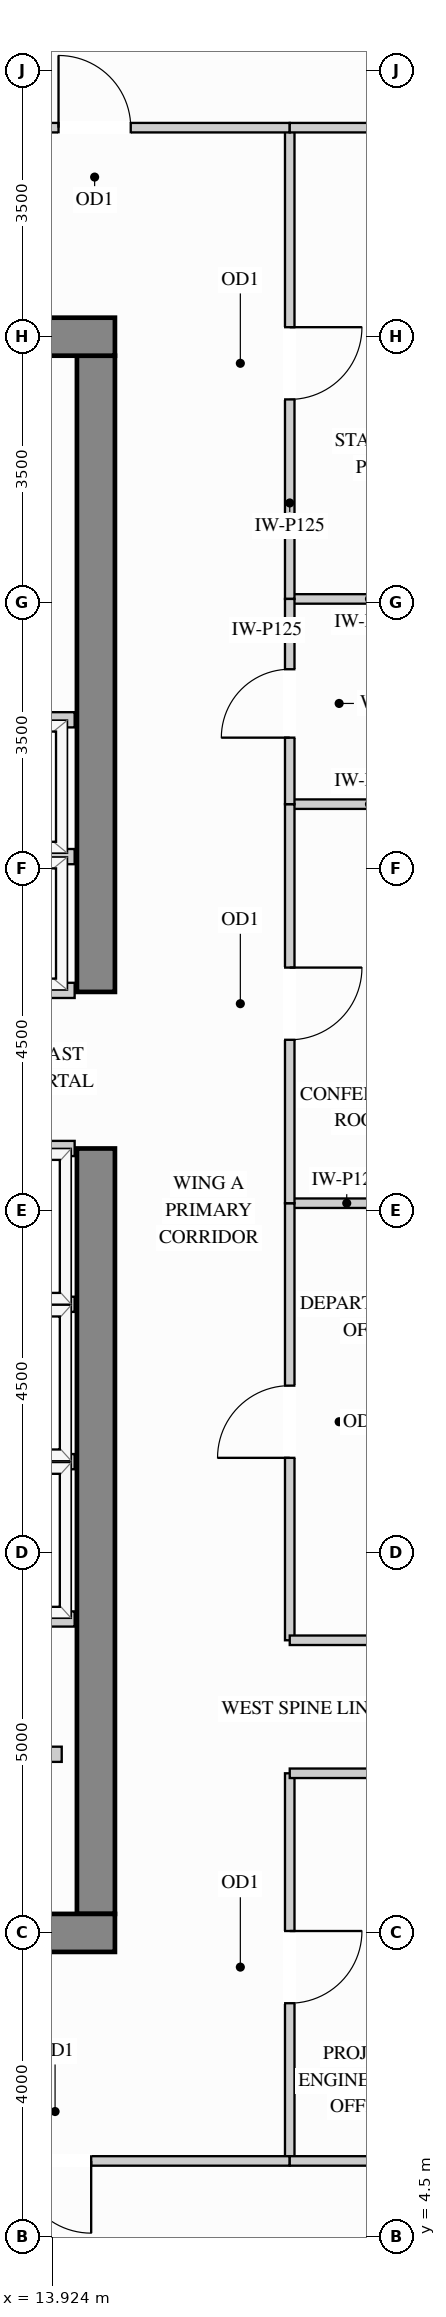
"""IFC4 building model, lengths in metres.
Left out: names, types, materials, properties, quantities, classifications, styles, units other than length and angle.
Written with IfcOpenShell. Run it as: python <this file> out.ifc"""

import sys

from ifc_helpers import new_model, si_unit, direction, frame, frame_2d, origin, place, context, subcontext, project, spatial, rectangle, extrude, source, transform, mapped, element, fill, save


model = new_model("IFC4")
c1 = context("Model", 3, precision=1e-05, world=origin(), true_north=direction((0.0, 1.0)))
c2 = subcontext(c1, "Body", "Model", "MODEL_VIEW")
j1 = project(units=[si_unit("LENGTHUNIT", "METRE"), si_unit("PLANEANGLEUNIT", "RADIAN")], contexts=[c1])
p1 = place(None, origin())
s1 = spatial("IfcSite", under=j1, at=p1, CompositionType="ELEMENT")
p2 = place(p1, origin())
s2 = spatial("IfcBuilding", under=s1, at=p2, CompositionType="ELEMENT")
p3 = place(p2, frame((0.0, 0.0, 259.2)))
s3 = spatial("IfcBuildingStorey", under=s2, at=p3, CompositionType="ELEMENT", Elevation=259.2)
m1 = source(origin(), c2, "Body", "SweptSolid", [
    extrude(rectangle(XDim=10.07, YDim=0.5, at=frame_2d((5.035, 0.0))), origin(), (0.0, 0.0, 1.0), 3.4),
])
p4 = place(p3, frame((14.5, 8.75, 0.0), z_axis=(0.0, 0.0, 1.0), x_axis=(0.0, 1.0, 0.0)))
e1 = element("IfcWall", 1, at=p4, inside=s3, PredefinedType="SHEAR", context=c2, shape_type="MappedRepresentation", body=[
    mapped(m1, transform((0.0, 0.0, 0.0), x_axis=(1.0, 0.0, 0.0), y_axis=(0.0, 1.0, 0.0), z_axis=(0.0, 0.0, 1.0))),
])
m2 = source(origin(), c2, "Body", "SweptSolid", [
    extrude(rectangle(XDim=8.37, YDim=0.5, at=frame_2d((4.185, 0.0))), origin(), (0.0, 0.0, 1.0), 3.4),
])
p5 = place(p3, frame((14.5, 20.88, 0.0), z_axis=(0.0, 0.0, 1.0), x_axis=(0.0, 1.0, 0.0)))
e2 = element("IfcWall", 2, at=p5, inside=s3, PredefinedType="SHEAR", context=c2, shape_type="MappedRepresentation", body=[
    mapped(m2, transform((0.0, 0.0, 0.0), x_axis=(1.0, 0.0, 0.0), y_axis=(0.0, 1.0, 0.0), z_axis=(0.0, 0.0, 1.0))),
])
m3 = source(origin(), c2, "Body", "SweptSolid", [
    extrude(rectangle(XDim=10.5, YDim=0.5, at=frame_2d((5.25, 0.0))), origin(), (0.0, 0.0, 1.0), 3.4),
])
for number, where, z_axis, x_axis in (
    (3, (4.25, 29.5, 0.0), (0.0, 0.0, 1.0), (1.0, 0.0, 0.0)),
    (4, (4.25, 8.5, 0.0), (0.0, 0.0, 1.0), (1.0, 0.0, 0.0)),
):
    element("IfcWall", number, at=place(p3, frame(where, z_axis=z_axis, x_axis=x_axis)), inside=s3, PredefinedType="SHEAR", context=c2, shape_type="MappedRepresentation", body=[
        mapped(m3, transform((0.0, 0.0, 0.0), x_axis=(1.0, 0.0, 0.0), y_axis=(0.0, 1.0, 0.0), z_axis=(0.0, 0.0, 1.0))),
    ])
m4 = source(origin(), c2, "Body", "SweptSolid", [
    extrude(rectangle(XDim=1.5, YDim=0.125, at=frame_2d((0.75, 0.0))), origin(), (0.0, 0.0, 1.0), 2.773),
])
p6 = place(p3, frame((17.05, 18.1, 0.0), z_axis=(0.0, 0.0, 1.0), x_axis=(1.0, 0.0, 0.0)))
e5 = element("IfcWall", 5, at=p6, inside=s3, PredefinedType="PARTITIONING", context=c2, shape_type="MappedRepresentation", body=[
    mapped(m4, transform((0.0, 0.0, 0.0), x_axis=(1.0, 0.0, 0.0), y_axis=(0.0, 1.0, 0.0), z_axis=(0.0, 0.0, 1.0))),
])
m5 = source(origin(), c2, "Body", "SweptSolid", [
    extrude(rectangle(XDim=2.098, YDim=0.125, at=frame_2d((1.049, 0.0))), origin(), (0.0, 0.0, 1.0), 3.385),
])
for number, where, z_axis, x_axis in (
    (6, (17.05, 23.35, 0.0), (0.0, 0.0, 1.0), (1.0, 0.0, 0.0)),
    (7, (17.05, 26.05, 0.0), (0.0, 0.0, 1.0), (1.0, 0.0, 0.0)),
):
    element("IfcWall", number, at=place(p3, frame(where, z_axis=z_axis, x_axis=x_axis)), inside=s3, PredefinedType="PARTITIONING", context=c2, shape_type="MappedRepresentation", body=[
        mapped(m5, transform((0.0, 0.0, 0.0), x_axis=(1.0, 0.0, 0.0), y_axis=(0.0, 1.0, 0.0), z_axis=(0.0, 0.0, 1.0))),
    ])
p7 = place(p3, frame((17.05, 12.35, 0.0), z_axis=(0.0, 0.0, 1.0), x_axis=(0.0, 1.0, 0.0)))
e8 = element("IfcWall", 8, at=p7, inside=s3, PredefinedType="PARTITIONING", context=c2, shape_type="SweptSolid", body=[
    extrude(rectangle(XDim=5.75, YDim=0.125, at=frame_2d((2.875, 0.0))), origin(), (0.0, 0.0, 1.0), 3.385),
])
p8 = place(p7, frame((2.4, 0.0, 0.0)))
e9 = element("IfcOpeningElement", 9, at=p8, cuts=e8, PredefinedType="OPENING", context=c2, shape_type="SweptSolid", body=[
    extrude(rectangle(XDim=0.95, YDim=2.15, at=frame_2d((0.475, 1.075))), frame((0.0, 0.073, 0.0), z_axis=(0.0, -1.0, 0.0), x_axis=(1.0, 0.0, 0.0)), (0.0, 0.0, 1.0), 0.145),
])
p9 = place(p3, frame((17.05, 18.1, 0.0), z_axis=(0.0, 0.0, 1.0), x_axis=(0.0, 1.0, 0.0)))
e10 = element("IfcWall", 10, at=p9, inside=s3, PredefinedType="PARTITIONING", context=c2, shape_type="SweptSolid", body=[
    extrude(rectangle(XDim=5.25, YDim=0.125, at=frame_2d((2.625, 0.0))), origin(), (0.0, 0.0, 1.0), 3.385),
])
p10 = place(p9, frame((2.15, 0.0, 0.0)))
e11 = element("IfcOpeningElement", 11, at=p10, cuts=e10, PredefinedType="OPENING", context=c2, shape_type="SweptSolid", body=[
    extrude(rectangle(XDim=0.95, YDim=2.15, at=frame_2d((0.475, 1.075))), frame((0.0, 0.073, 0.0), z_axis=(0.0, -1.0, 0.0), x_axis=(1.0, 0.0, 0.0)), (0.0, 0.0, 1.0), 0.145),
])
p11 = place(p3, frame((17.05, 26.05, 0.0), z_axis=(0.0, 0.0, 1.0), x_axis=(0.0, 1.0, 0.0)))
e12 = element("IfcWall", 12, at=p11, inside=s3, PredefinedType="PARTITIONING", context=c2, shape_type="SweptSolid", body=[
    extrude(rectangle(XDim=6.2, YDim=0.125, at=frame_2d((3.1, 0.0))), origin(), (0.0, 0.0, 1.0), 3.385),
])
p12 = place(p11, frame((2.625, 0.0, 0.0)))
e13 = element("IfcOpeningElement", 13, at=p12, cuts=e12, PredefinedType="OPENING", context=c2, shape_type="SweptSolid", body=[
    extrude(rectangle(XDim=0.95, YDim=2.15, at=frame_2d((0.475, 1.075))), frame((0.0, 0.073, 0.0), z_axis=(0.0, -1.0, 0.0), x_axis=(1.0, 0.0, 0.0)), (0.0, 0.0, 1.0), 0.145),
])
p13 = place(p3, frame((17.05, 5.5, 0.0), z_axis=(0.0, 0.0, 1.0), x_axis=(0.0, 1.0, 0.0)))
e14 = element("IfcWall", 14, at=p13, inside=s3, PredefinedType="PARTITIONING", context=c2, shape_type="SweptSolid", body=[
    extrude(rectangle(XDim=5.1, YDim=0.125, at=frame_2d((2.55, 0.0))), origin(), (0.0, 0.0, 1.0), 3.385),
])
p14 = place(p13, frame((2.075, 0.0, 0.0)))
e15 = element("IfcOpeningElement", 15, at=p14, cuts=e14, PredefinedType="OPENING", context=c2, shape_type="SweptSolid", body=[
    extrude(rectangle(XDim=0.95, YDim=2.15, at=frame_2d((0.475, 1.075))), frame((0.0, 0.073, 0.0), z_axis=(0.0, -1.0, 0.0), x_axis=(1.0, 0.0, 0.0)), (0.0, 0.0, 1.0), 0.145),
])
p15 = place(p3, frame((17.05, 23.35, 0.0), z_axis=(0.0, 0.0, 1.0), x_axis=(0.0, 1.0, 0.0)))
e16 = element("IfcWall", 16, at=p15, inside=s3, PredefinedType="PARTITIONING", context=c2, shape_type="SweptSolid", body=[
    extrude(rectangle(XDim=2.7, YDim=0.125, at=frame_2d((1.35, 0.0))), origin(), (0.0, 0.0, 1.0), 3.385),
])
p16 = place(p15, frame((0.875, 0.0, 0.0)))
e17 = element("IfcOpeningElement", 17, at=p16, cuts=e16, PredefinedType="OPENING", context=c2, shape_type="SweptSolid", body=[
    extrude(rectangle(XDim=0.9, YDim=2.15, at=frame_2d((0.45, 1.075))), frame((0.0, 0.073, 0.0), z_axis=(0.0, -1.0, 0.0), x_axis=(1.0, 0.0, 0.0)), (0.0, 0.0, 1.0), 0.145),
])
p17 = place(p3, frame((11.916, 32.25, 0.0), z_axis=(0.0, 0.0, 1.0), x_axis=(1.0, 0.0, 0.0)))
e18 = element("IfcWall", 18, at=p17, inside=s3, PredefinedType="PARTITIONING", context=c2, shape_type="SweptSolid", body=[
    extrude(rectangle(XDim=5.134, YDim=0.125, at=frame_2d((2.567, 0.0))), origin(), (0.0, 0.0, 1.0), 3.385),
])
p18 = place(p17, frame((2.092, 0.0, 0.0)))
e19 = element("IfcOpeningElement", 19, at=p18, cuts=e18, PredefinedType="OPENING", context=c2, shape_type="SweptSolid", body=[
    extrude(rectangle(XDim=0.95, YDim=2.15, at=frame_2d((0.475, 1.075))), frame((0.0, 0.073, 0.0), z_axis=(0.0, -1.0, 0.0), x_axis=(1.0, 0.0, 0.0)), (0.0, 0.0, 1.0), 0.145),
])
p19 = place(p3, frame((17.05, 32.25, 0.0), z_axis=(0.0, 0.0, 1.0), x_axis=(1.0, 0.0, 0.0)))
e20 = element("IfcWall", 20, at=p19, inside=s3, PredefinedType="PARTITIONING", context=c2, shape_type="MappedRepresentation", body=[
    mapped(m5, transform((0.0, 0.0, 0.0), x_axis=(1.0, 0.0, 0.0), y_axis=(0.0, 1.0, 0.0), z_axis=(0.0, 0.0, 1.0))),
])
m6 = source(origin(), c2, "Body", "SweptSolid", [
    extrude(rectangle(XDim=2.45, YDim=0.125, at=frame_2d((1.225, 0.0))), origin(), (0.0, 0.0, 1.0), 3.385),
])
for number, where, z_axis, x_axis in (
    (21, (17.05, 12.35, 0.0), (0.0, 0.0, 1.0), (1.0, 0.0, 0.0)),
    (22, (17.05, 10.6, 0.0), (0.0, 0.0, 1.0), (1.0, 0.0, 0.0)),
):
    element("IfcWall", number, at=place(p3, frame(where, z_axis=z_axis, x_axis=x_axis)), inside=s3, PredefinedType="PARTITIONING", context=c2, shape_type="MappedRepresentation", body=[
        mapped(m6, transform((0.0, 0.0, 0.0), x_axis=(1.0, 0.0, 0.0), y_axis=(0.0, 1.0, 0.0), z_axis=(0.0, 0.0, 1.0))),
    ])
p20 = place(p3, frame((10.875, 5.5, 0.0), z_axis=(0.0, 0.0, 1.0), x_axis=(1.0, 0.0, 0.0)))
e23 = element("IfcWall", 23, at=p20, inside=s3, PredefinedType="PARTITIONING", context=c2, shape_type="SweptSolid", body=[
    extrude(rectangle(XDim=6.175, YDim=0.125, at=frame_2d((3.087, 0.0))), origin(), (0.0, 0.0, 1.0), 3.385),
])
p21 = place(p20, frame((2.613, 0.0, 0.0)))
e24 = element("IfcOpeningElement", 24, at=p21, cuts=e23, PredefinedType="OPENING", context=c2, shape_type="SweptSolid", body=[
    extrude(rectangle(XDim=0.95, YDim=2.15, at=frame_2d((0.475, 1.075))), frame((0.0, 0.073, 0.0), z_axis=(0.0, -1.0, 0.0), x_axis=(1.0, 0.0, 0.0)), (0.0, 0.0, 1.0), 0.145),
])
m7 = source(origin(), c2, "Body", "SweptSolid", [
    extrude(rectangle(XDim=2.1, YDim=0.125, at=frame_2d((1.05, 0.0))), origin(), (0.0, 0.0, 1.0), 3.385),
])
p22 = place(p3, frame((17.05, 5.5, 0.0), z_axis=(0.0, 0.0, 1.0), x_axis=(1.0, 0.0, 0.0)))
e25 = element("IfcWall", 25, at=p22, inside=s3, PredefinedType="PARTITIONING", context=c2, shape_type="MappedRepresentation", body=[
    mapped(m7, transform((0.0, 0.0, 0.0), x_axis=(1.0, 0.0, 0.0), y_axis=(0.0, 1.0, 0.0), z_axis=(0.0, 0.0, 1.0))),
])
m8 = source(origin(), c2, "Body", "SweptSolid", [
    extrude(rectangle(XDim=1.63, YDim=0.2, at=frame_2d((0.815, 0.0))), origin(), (0.0, 0.0, 1.0), 3.385),
])
p23 = place(p3, frame((12.42, 10.85, 0.0), z_axis=(0.0, 0.0, 1.0), x_axis=(1.0, 0.0, 0.0)))
e26 = element("IfcWall", 26, at=p23, inside=s3, PredefinedType="PARTITIONING", context=c2, shape_type="MappedRepresentation", body=[
    mapped(m8, transform((0.0, 0.0, 0.0), x_axis=(1.0, 0.0, 0.0), y_axis=(0.0, 1.0, 0.0), z_axis=(0.0, 0.0, 1.0))),
])
m9 = source(origin(), c2, "Body", "SweptSolid", [
    extrude(rectangle(XDim=2.39, YDim=0.2, at=frame_2d((1.195, 0.0))), origin(), (0.0, 0.0, 1.0), 3.385),
])
for number, where, z_axis, x_axis in (
    (27, (11.83, 22.66, 0.0), (0.0, 0.0, 1.0), (1.0, 0.0, 0.0)),
    (28, (11.83, 20.9, 0.0), (0.0, 0.0, 1.0), (1.0, 0.0, 0.0)),
    (29, (11.83, 24.46, 0.0), (0.0, 0.0, 1.0), (1.0, 0.0, 0.0)),
):
    element("IfcWall", number, at=place(p3, frame(where, z_axis=z_axis, x_axis=x_axis)), inside=s3, PredefinedType="PARTITIONING", context=c2, shape_type="MappedRepresentation", body=[
        mapped(m9, transform((0.0, 0.0, 0.0), x_axis=(1.0, 0.0, 0.0), y_axis=(0.0, 1.0, 0.0), z_axis=(0.0, 0.0, 1.0))),
    ])
m10 = source(origin(), c2, "Body", "SweptSolid", [
    extrude(rectangle(XDim=1.99, YDim=0.2, at=frame_2d((0.995, 0.0))), origin(), (0.0, 0.0, 1.0), 3.385),
])
for number, where, z_axis, x_axis in (
    (30, (12.23, 14.7, 0.0), (0.0, 0.0, 1.0), (1.0, 0.0, 0.0)),
    (31, (12.23, 12.63, 0.0), (0.0, 0.0, 1.0), (1.0, 0.0, 0.0)),
    (32, (12.23, 16.77, 0.0), (0.0, 0.0, 1.0), (1.0, 0.0, 0.0)),
    (33, (12.23, 18.82, 0.0), (0.0, 0.0, 1.0), (1.0, 0.0, 0.0)),
):
    element("IfcWall", number, at=place(p3, frame(where, z_axis=z_axis, x_axis=x_axis)), inside=s3, PredefinedType="PARTITIONING", context=c2, shape_type="MappedRepresentation", body=[
        mapped(m10, transform((0.0, 0.0, 0.0), x_axis=(1.0, 0.0, 0.0), y_axis=(0.0, 1.0, 0.0), z_axis=(0.0, 0.0, 1.0))),
    ])
m11 = source(origin(), c2, "Body", "SweptSolid", [
    extrude(rectangle(XDim=0.95, YDim=2.15, at=frame_2d((0.475, 1.075))), frame((0.0, 0.025, 0.0), z_axis=(0.0, -1.0, 0.0), x_axis=(1.0, 0.0, 0.0)), (0.0, 0.0, 1.0), 0.05),
])
p24 = place(p14, origin())
e34 = element("IfcDoor", 34, at=p24, inside=s3, OperationType="SINGLE_SWING_RIGHT", PredefinedType="DOOR", context=c2, shape_type="MappedRepresentation", body=[
    mapped(m11, transform((0.0, 0.0, 0.0), x_axis=(1.0, 0.0, 0.0), y_axis=(0.0, 1.0, 0.0), z_axis=(0.0, 0.0, 1.0))),
])
fill(e15, e34)
p25 = place(p8, origin())
e35 = element("IfcDoor", 35, at=p25, inside=s3, OperationType="SINGLE_SWING_LEFT", PredefinedType="DOOR", context=c2, shape_type="MappedRepresentation", body=[
    mapped(m11, transform((0.0, 0.0, 0.0), x_axis=(1.0, 0.0, 0.0), y_axis=(0.0, 1.0, 0.0), z_axis=(0.0, 0.0, 1.0))),
])
fill(e9, e35)
p26 = place(p10, origin())
e36 = element("IfcDoor", 36, at=p26, inside=s3, OperationType="SINGLE_SWING_RIGHT", PredefinedType="DOOR", context=c2, shape_type="MappedRepresentation", body=[
    mapped(m11, transform((0.0, 0.0, 0.0), x_axis=(1.0, 0.0, 0.0), y_axis=(0.0, 1.0, 0.0), z_axis=(0.0, 0.0, 1.0))),
])
fill(e11, e36)
p27 = place(p12, origin())
e37 = element("IfcDoor", 37, at=p27, inside=s3, OperationType="SINGLE_SWING_RIGHT", PredefinedType="DOOR", context=c2, shape_type="MappedRepresentation", body=[
    mapped(m11, transform((0.0, 0.0, 0.0), x_axis=(1.0, 0.0, 0.0), y_axis=(0.0, 1.0, 0.0), z_axis=(0.0, 0.0, 1.0))),
])
fill(e13, e37)
p28 = place(p18, origin())
e38 = element("IfcDoor", 38, at=p28, inside=s3, OperationType="SINGLE_SWING_LEFT", PredefinedType="DOOR", context=c2, shape_type="MappedRepresentation", body=[
    mapped(m11, transform((0.0, 0.0, 0.0), x_axis=(1.0, 0.0, 0.0), y_axis=(0.0, 1.0, 0.0), z_axis=(0.0, 0.0, 1.0))),
])
fill(e19, e38)
p29 = place(p21, origin())
e39 = element("IfcDoor", 39, at=p29, inside=s3, OperationType="SINGLE_SWING_RIGHT", PredefinedType="DOOR", context=c2, shape_type="MappedRepresentation", body=[
    mapped(m11, transform((0.0, 0.0, 0.0), x_axis=(1.0, 0.0, 0.0), y_axis=(0.0, 1.0, 0.0), z_axis=(0.0, 0.0, 1.0))),
])
fill(e24, e39)
m12 = source(origin(), c2, "Body", "SweptSolid", [
    extrude(rectangle(XDim=0.9, YDim=2.15, at=frame_2d((0.45, 1.075))), frame((0.0, 0.025, 0.0), z_axis=(0.0, -1.0, 0.0), x_axis=(1.0, 0.0, 0.0)), (0.0, 0.0, 1.0), 0.05),
])
p30 = place(p16, origin())
e40 = element("IfcDoor", 40, at=p30, inside=s3, OperationType="SINGLE_SWING_LEFT", PredefinedType="DOOR", context=c2, shape_type="MappedRepresentation", body=[
    mapped(m12, transform((0.0, 0.0, 0.0), x_axis=(1.0, 0.0, 0.0), y_axis=(0.0, 1.0, 0.0), z_axis=(0.0, 0.0, 1.0))),
])
fill(e17, e40)
save(model, sys.argv[1])
